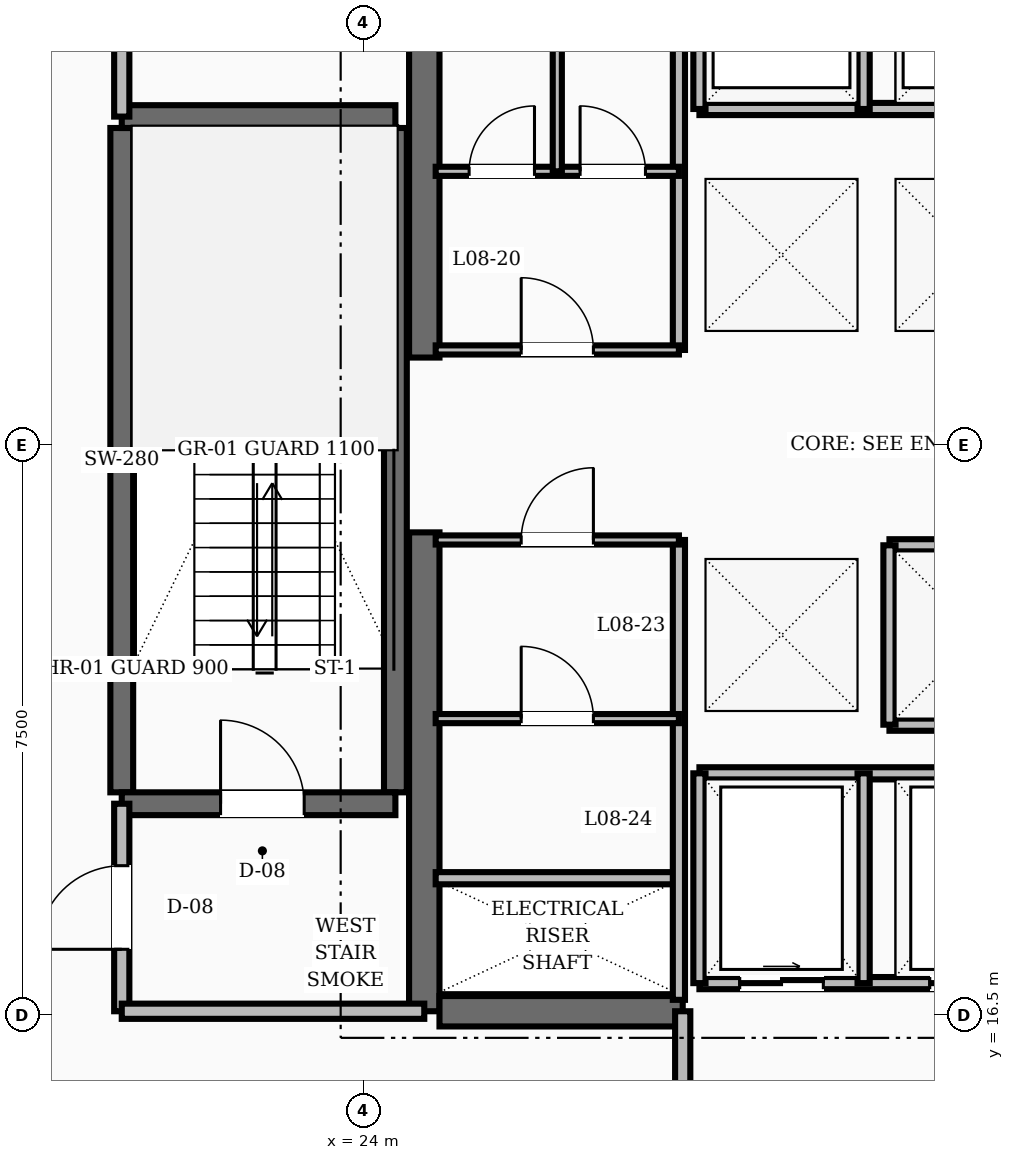
"""IFC4 building model, lengths in metres.
Left out: names, types, materials, properties, quantities, classifications, styles, units other than length and angle.
Written with IfcOpenShell. Run it as: python <this file> out.ifc"""

import sys

from ifc_helpers import new_model, si_unit, direction, frame, frame_2d, origin, place, context, subcontext, project, spatial, rectangle, extrude, element, fill, save


model = new_model("IFC4")
c1 = context("Model", 3, precision=1e-05, world=origin(), true_north=direction((0.0, 1.0)))
c2 = subcontext(c1, "Body", "Model", "MODEL_VIEW")
j1 = project(units=[si_unit("LENGTHUNIT", "METRE"), si_unit("PLANEANGLEUNIT", "RADIAN")], contexts=[c1])
p1 = place(None, origin())
s1 = spatial("IfcSite", under=j1, at=p1, CompositionType="ELEMENT")
p2 = place(p1, origin())
s2 = spatial("IfcBuilding", under=s1, at=p2, CompositionType="ELEMENT")
p3 = place(p2, frame((0.0, 0.0, 37.6)))
s3 = spatial("IfcBuildingStorey", under=s2, at=p3, CompositionType="ELEMENT", Elevation=37.6)
for number, where, z_axis, x_axis in (
    (1, (24.8, 16.55, 0.0), (0.0, 0.0, 1.0), (0.0, 1.0, 0.0)),
    (2, (24.8, 25.15, 0.0), (0.0, 0.0, 1.0), (0.0, 1.0, 0.0)),
):
    element("IfcWall", number, at=place(p3, frame(where, z_axis=z_axis, x_axis=x_axis)), inside=s3, PredefinedType="SHEAR", context=c2, shape_type="SweptSolid", body=[
        extrude(rectangle(XDim=6.3, YDim=0.4, at=frame_2d((3.15, 0.0))), origin(), (0.0, 0.0, 1.0), 3.6),
    ])
p4 = place(p3, frame((25.0, 16.55, 0.0), z_axis=(0.0, 0.0, 1.0), x_axis=(1.0, 0.0, 0.0)))
e3 = element("IfcWall", 3, at=p4, inside=s3, PredefinedType="SHEAR", context=c2, shape_type="SweptSolid", body=[
    extrude(rectangle(XDim=3.2, YDim=0.4, at=frame_2d((1.6, 0.0))), origin(), (0.0, 0.0, 1.0), 3.6),
])
for number, where, z_axis, x_axis in (
    (4, (20.82, 19.43, 0.0), (0.0, 0.0, 1.0), (0.0, 1.0, 0.0)),
    (5, (24.42, 19.43, 0.0), (0.0, 0.0, 1.0), (0.0, 1.0, 0.0)),
):
    element("IfcWall", number, at=place(p3, frame(where, z_axis=z_axis, x_axis=x_axis)), inside=s3, PredefinedType="SHEAR", context=c2, shape_type="SweptSolid", body=[
        extrude(rectangle(XDim=8.74, YDim=0.3, at=frame_2d((4.37, 0.0))), origin(), (0.0, 0.0, 1.0), 3.6),
    ])
p5 = place(p3, frame((20.82, 19.28, 0.0), z_axis=(0.0, 0.0, 1.0), x_axis=(1.0, 0.0, 0.0)))
e6 = element("IfcWall", 6, at=p5, inside=s3, PredefinedType="SHEAR", context=c2, shape_type="SweptSolid", body=[
    extrude(rectangle(XDim=3.6, YDim=0.3, at=frame_2d((1.8, 0.0))), origin(), (0.0, 0.0, 1.0), 3.6),
])
p6 = place(p5, frame((1.3, 0.0, 0.0)))
e7 = element("IfcOpeningElement", 7, at=p6, cuts=e6, PredefinedType="OPENING", context=c2, shape_type="SweptSolid", body=[
    extrude(rectangle(XDim=1.1, YDim=2.1, at=frame_2d((0.55, 1.05))), frame((0.0, 0.16, 0.0), z_axis=(0.0, -1.0, 0.0), x_axis=(1.0, 0.0, 0.0)), (0.0, 0.0, 1.0), 0.32),
])
p7 = place(p3, frame((20.82, 28.32, 0.0), z_axis=(0.0, 0.0, 1.0), x_axis=(1.0, 0.0, 0.0)))
e8 = element("IfcWall", 8, at=p7, inside=s3, PredefinedType="SHEAR", context=c2, shape_type="SweptSolid", body=[
    extrude(rectangle(XDim=3.6, YDim=0.3, at=frame_2d((1.8, 0.0))), origin(), (0.0, 0.0, 1.0), 3.6),
])
p8 = place(p3, frame((20.82, 16.55, 0.0), z_axis=(0.0, 0.0, 1.0), x_axis=(0.0, 1.0, 0.0)))
e9 = element("IfcWall", 9, at=p8, inside=s3, PredefinedType="SOLIDWALL", context=c2, shape_type="SweptSolid", body=[
    extrude(rectangle(XDim=2.73, YDim=0.2, at=frame_2d((1.365, 0.0))), origin(), (0.0, 0.0, 1.0), 2.61),
])
p9 = place(p8, frame((0.815, 0.0, 0.0)))
e10 = element("IfcOpeningElement", 10, at=p9, cuts=e9, PredefinedType="OPENING", context=c2, shape_type="SweptSolid", body=[
    extrude(rectangle(XDim=1.1, YDim=2.1, at=frame_2d((0.55, 1.05))), frame((0.0, 0.11, 0.0), z_axis=(0.0, -1.0, 0.0), x_axis=(1.0, 0.0, 0.0)), (0.0, 0.0, 1.0), 0.22),
])
p10 = place(p3, frame((20.82, 16.55, 0.0), z_axis=(0.0, 0.0, 1.0), x_axis=(1.0, 0.0, 0.0)))
e11 = element("IfcWall", 11, at=p10, inside=s3, PredefinedType="SOLIDWALL", context=c2, shape_type="SweptSolid", body=[
    extrude(rectangle(XDim=3.98, YDim=0.2, at=frame_2d((1.99, 0.0))), origin(), (0.0, 0.0, 1.0), 2.61),
])
p11 = place(p3, frame((20.82, 28.32, 0.0), z_axis=(0.0, 0.0, 1.0), x_axis=(0.0, 1.0, 0.0)))
e12 = element("IfcWall", 12, at=p11, inside=s3, PredefinedType="SOLIDWALL", context=c2, shape_type="SweptSolid", body=[
    extrude(rectangle(XDim=3.13, YDim=0.2, at=frame_2d((1.565, 0.0))), origin(), (0.0, 0.0, 1.0), 2.61),
])
p12 = place(p11, frame((1.09, 0.0, 0.0)))
e13 = element("IfcOpeningElement", 13, at=p12, cuts=e12, PredefinedType="OPENING", context=c2, shape_type="SweptSolid", body=[
    extrude(rectangle(XDim=0.95, YDim=2.1, at=frame_2d((0.475, 1.05))), frame((0.0, 0.11, 0.0), z_axis=(0.0, -1.0, 0.0), x_axis=(1.0, 0.0, 0.0)), (0.0, 0.0, 1.0), 0.22),
])
p13 = place(p3, frame((28.2, 14.35, 0.0), z_axis=(0.0, 0.0, 1.0), x_axis=(0.0, 1.0, 0.0)))
e14 = element("IfcWall", 14, at=p13, inside=s3, PredefinedType="SOLIDWALL", context=c2, shape_type="SweptSolid", body=[
    extrude(rectangle(XDim=2.2, YDim=0.2, at=frame_2d((1.1, 0.0))), origin(), (0.0, 0.0, 1.0), 2.61),
])
p14 = place(p3, frame((28.42, 28.42, 0.0), z_axis=(0.0, 0.0, 1.0), x_axis=(1.0, 0.0, 0.0)))
e15 = element("IfcWall", 15, at=p14, inside=s3, PredefinedType="SOLIDWALL", context=c2, shape_type="SweptSolid", body=[
    extrude(rectangle(XDim=7.16, YDim=0.16, at=frame_2d((3.58, 0.0))), origin(), (0.0, 0.0, 1.0), 2.61),
])
for number, where, z_axis, x_axis in (
    (16, (28.42, 28.42, 0.0), (0.0, 0.0, 1.0), (0.0, 1.0, 0.0)),
    (17, (30.58, 28.42, 0.0), (0.0, 0.0, 1.0), (0.0, 1.0, 0.0)),
):
    element("IfcWall", number, at=place(p3, frame(where, z_axis=z_axis, x_axis=x_axis)), inside=s3, PredefinedType="SOLIDWALL", context=c2, shape_type="SweptSolid", body=[
        extrude(rectangle(XDim=2.16, YDim=0.16, at=frame_2d((1.08, 0.0))), origin(), (0.0, 0.0, 1.0), 2.61),
    ])
for number, where, z_axis, x_axis in (
    (18, (30.92, 22.68, 0.0), (0.0, 0.0, 1.0), (1.0, 0.0, 0.0)),
    (19, (30.92, 20.32, 0.0), (0.0, 0.0, 1.0), (1.0, 0.0, 0.0)),
):
    element("IfcWall", number, at=place(p3, frame(where, z_axis=z_axis, x_axis=x_axis)), inside=s3, PredefinedType="SOLIDWALL", context=c2, shape_type="SweptSolid", body=[
        extrude(rectangle(XDim=4.76, YDim=0.16, at=frame_2d((2.38, 0.0))), origin(), (0.0, 0.0, 1.0), 2.61),
    ])
p15 = place(p3, frame((30.92, 20.32, 0.0), z_axis=(0.0, 0.0, 1.0), x_axis=(0.0, 1.0, 0.0)))
e20 = element("IfcWall", 20, at=p15, inside=s3, PredefinedType="SOLIDWALL", context=c2, shape_type="SweptSolid", body=[
    extrude(rectangle(XDim=2.36, YDim=0.16, at=frame_2d((1.18, 0.0))), origin(), (0.0, 0.0, 1.0), 2.61),
])
p16 = place(p3, frame((28.42, 16.92, 0.0), z_axis=(0.0, 0.0, 1.0), x_axis=(1.0, 0.0, 0.0)))
e21 = element("IfcWall", 21, at=p16, inside=s3, PredefinedType="SOLIDWALL", context=c2, shape_type="SweptSolid", body=[
    extrude(rectangle(XDim=7.16, YDim=0.16, at=frame_2d((3.58, 0.0))), origin(), (0.0, 0.0, 1.0), 2.61),
])
p17 = place(p16, frame((0.53, 0.0, 0.0)))
e22 = element("IfcOpeningElement", 22, at=p17, cuts=e21, PredefinedType="OPENING", context=c2, shape_type="SweptSolid", body=[
    extrude(rectangle(XDim=1.1, YDim=2.15, at=frame_2d((0.55, 1.075))), frame((0.0, 0.09, 0.0), z_axis=(0.0, -1.0, 0.0), x_axis=(1.0, 0.0, 0.0)), (0.0, 0.0, 1.0), 0.18),
])
p18 = place(p16, frame((3.03, 0.0, 0.0)))
e23 = element("IfcOpeningElement", 23, at=p18, cuts=e21, PredefinedType="OPENING", context=c2, shape_type="SweptSolid", body=[
    extrude(rectangle(XDim=1.1, YDim=2.15, at=frame_2d((0.55, 1.075))), frame((0.0, 0.09, 0.0), z_axis=(0.0, -1.0, 0.0), x_axis=(1.0, 0.0, 0.0)), (0.0, 0.0, 1.0), 0.18),
])
p19 = place(p16, frame((5.53, 0.0, 0.0)))
e24 = element("IfcOpeningElement", 24, at=p19, cuts=e21, PredefinedType="OPENING", context=c2, shape_type="SweptSolid", body=[
    extrude(rectangle(XDim=1.1, YDim=2.15, at=frame_2d((0.55, 1.075))), frame((0.0, 0.09, 0.0), z_axis=(0.0, -1.0, 0.0), x_axis=(1.0, 0.0, 0.0)), (0.0, 0.0, 1.0), 0.18),
])
p20 = place(p3, frame((28.42, 19.68, 0.0), z_axis=(0.0, 0.0, 1.0), x_axis=(1.0, 0.0, 0.0)))
e25 = element("IfcWall", 25, at=p20, inside=s3, PredefinedType="SOLIDWALL", context=c2, shape_type="SweptSolid", body=[
    extrude(rectangle(XDim=7.16, YDim=0.16, at=frame_2d((3.58, 0.0))), origin(), (0.0, 0.0, 1.0), 2.61),
])
for number, where, z_axis, x_axis in (
    (26, (28.42, 16.92, 0.0), (0.0, 0.0, 1.0), (0.0, 1.0, 0.0)),
    (27, (30.58, 16.92, 0.0), (0.0, 0.0, 1.0), (0.0, 1.0, 0.0)),
):
    element("IfcWall", number, at=place(p3, frame(where, z_axis=z_axis, x_axis=x_axis)), inside=s3, PredefinedType="SOLIDWALL", context=c2, shape_type="SweptSolid", body=[
        extrude(rectangle(XDim=2.76, YDim=0.16, at=frame_2d((1.38, 0.0))), origin(), (0.0, 0.0, 1.0), 2.61),
    ])
p21 = place(p3, frame((24.95, 18.3, 0.0), z_axis=(0.0, 0.0, 1.0), x_axis=(1.0, 0.0, 0.0)))
e28 = element("IfcWall", 28, at=p21, inside=s3, PredefinedType="SOLIDWALL", context=c2, shape_type="SweptSolid", body=[
    extrude(rectangle(XDim=3.2, YDim=0.16, at=frame_2d((1.6, 0.0))), origin(), (0.0, 0.0, 1.0), 2.61),
])
p22 = place(p3, frame((28.15, 16.7, 0.0), z_axis=(0.0, 0.0, 1.0), x_axis=(0.0, 1.0, 0.0)))
e29 = element("IfcWall", 29, at=p22, inside=s3, PredefinedType="SOLIDWALL", context=c2, shape_type="SweptSolid", body=[
    extrude(rectangle(XDim=6.05, YDim=0.16, at=frame_2d((3.025, 0.0))), origin(), (0.0, 0.0, 1.0), 2.61),
])
p23 = place(p3, frame((28.15, 25.25, 0.0), z_axis=(0.0, 0.0, 1.0), x_axis=(0.0, 1.0, 0.0)))
e30 = element("IfcWall", 30, at=p23, inside=s3, PredefinedType="SOLIDWALL", context=c2, shape_type="SweptSolid", body=[
    extrude(rectangle(XDim=6.1, YDim=0.16, at=frame_2d((3.05, 0.0))), origin(), (0.0, 0.0, 1.0), 2.61),
])
p24 = place(p3, frame((24.95, 25.25, 0.0), z_axis=(0.0, 0.0, 1.0), x_axis=(1.0, 0.0, 0.0)))
e31 = element("IfcWall", 31, at=p24, inside=s3, PredefinedType="PARTITIONING", context=c2, shape_type="SweptSolid", body=[
    extrude(rectangle(XDim=3.2, YDim=0.12, at=frame_2d((1.6, 0.0))), origin(), (0.0, 0.0, 1.0), 2.61),
])
p25 = place(p24, frame((1.125, 0.0, 0.0)))
e32 = element("IfcOpeningElement", 32, at=p25, cuts=e31, PredefinedType="OPENING", context=c2, shape_type="SweptSolid", body=[
    extrude(rectangle(XDim=0.95, YDim=2.1, at=frame_2d((0.475, 1.05))), frame((0.0, 0.07, 0.0), z_axis=(0.0, -1.0, 0.0), x_axis=(1.0, 0.0, 0.0)), (0.0, 0.0, 1.0), 0.14),
])
p26 = place(p3, frame((24.95, 22.75, 0.0), z_axis=(0.0, 0.0, 1.0), x_axis=(1.0, 0.0, 0.0)))
e33 = element("IfcWall", 33, at=p26, inside=s3, PredefinedType="PARTITIONING", context=c2, shape_type="SweptSolid", body=[
    extrude(rectangle(XDim=3.2, YDim=0.12, at=frame_2d((1.6, 0.0))), origin(), (0.0, 0.0, 1.0), 2.61),
])
p27 = place(p26, frame((1.125, 0.0, 0.0)))
e34 = element("IfcOpeningElement", 34, at=p27, cuts=e33, PredefinedType="OPENING", context=c2, shape_type="SweptSolid", body=[
    extrude(rectangle(XDim=0.95, YDim=2.1, at=frame_2d((0.475, 1.05))), frame((0.0, 0.07, 0.0), z_axis=(0.0, -1.0, 0.0), x_axis=(1.0, 0.0, 0.0)), (0.0, 0.0, 1.0), 0.14),
])
p28 = place(p3, frame((24.95, 27.6, 0.0), z_axis=(0.0, 0.0, 1.0), x_axis=(1.0, 0.0, 0.0)))
e35 = element("IfcWall", 35, at=p28, inside=s3, PredefinedType="PARTITIONING", context=c2, shape_type="SweptSolid", body=[
    extrude(rectangle(XDim=3.2, YDim=0.12, at=frame_2d((1.6, 0.0))), origin(), (0.0, 0.0, 1.0), 2.61),
])
p29 = place(p28, frame((0.44, 0.0, 0.0)))
e36 = element("IfcOpeningElement", 36, at=p29, cuts=e35, PredefinedType="OPENING", context=c2, shape_type="SweptSolid", body=[
    extrude(rectangle(XDim=0.86, YDim=2.1, at=frame_2d((0.43, 1.05))), frame((0.0, 0.07, 0.0), z_axis=(0.0, -1.0, 0.0), x_axis=(1.0, 0.0, 0.0)), (0.0, 0.0, 1.0), 0.14),
])
p30 = place(p28, frame((1.9, 0.0, 0.0)))
e37 = element("IfcOpeningElement", 37, at=p30, cuts=e35, PredefinedType="OPENING", context=c2, shape_type="SweptSolid", body=[
    extrude(rectangle(XDim=0.86, YDim=2.1, at=frame_2d((0.43, 1.05))), frame((0.0, 0.07, 0.0), z_axis=(0.0, -1.0, 0.0), x_axis=(1.0, 0.0, 0.0)), (0.0, 0.0, 1.0), 0.14),
])
p31 = place(p3, frame((26.55, 27.6, 0.0), z_axis=(0.0, 0.0, 1.0), x_axis=(0.0, 1.0, 0.0)))
e38 = element("IfcWall", 38, at=p31, inside=s3, PredefinedType="PARTITIONING", context=c2, shape_type="SweptSolid", body=[
    extrude(rectangle(XDim=3.75, YDim=0.12, at=frame_2d((1.875, 0.0))), origin(), (0.0, 0.0, 1.0), 2.61),
])
p32 = place(p3, frame((24.95, 20.4, 0.0), z_axis=(0.0, 0.0, 1.0), x_axis=(1.0, 0.0, 0.0)))
e39 = element("IfcWall", 39, at=p32, inside=s3, PredefinedType="PARTITIONING", context=c2, shape_type="SweptSolid", body=[
    extrude(rectangle(XDim=3.2, YDim=0.12, at=frame_2d((1.6, 0.0))), origin(), (0.0, 0.0, 1.0), 2.61),
])
p33 = place(p32, frame((1.125, 0.0, 0.0)))
e40 = element("IfcOpeningElement", 40, at=p33, cuts=e39, PredefinedType="OPENING", context=c2, shape_type="SweptSolid", body=[
    extrude(rectangle(XDim=0.95, YDim=2.1, at=frame_2d((0.475, 1.05))), frame((0.0, 0.07, 0.0), z_axis=(0.0, -1.0, 0.0), x_axis=(1.0, 0.0, 0.0)), (0.0, 0.0, 1.0), 0.14),
])
p34 = place(p3, frame((18.655, 16.583, 0.0), z_axis=(0.0, 0.0, 1.0), x_axis=(0.702366174226, -0.711815816981, 0.0)))
e41 = element("IfcWall", 41, at=p34, inside=s3, PredefinedType="SOLIDWALL", context=c2, shape_type="SweptSolid", body=[
    extrude(rectangle(XDim=2.842, YDim=0.16, at=frame_2d((1.421, 0.0))), origin(), (0.0, 0.0, 1.0), 2.61),
])
p35 = place(p6, origin())
e42 = element("IfcDoor", 42, at=p35, inside=s3, OperationType="SINGLE_SWING_LEFT", PredefinedType="DOOR", context=c2, shape_type="SweptSolid", body=[
    extrude(rectangle(XDim=1.1, YDim=2.1, at=frame_2d((0.55, 1.05))), frame((0.0, 0.025, 0.0), z_axis=(0.0, -1.0, 0.0), x_axis=(1.0, 0.0, 0.0)), (0.0, 0.0, 1.0), 0.05),
])
fill(e7, e42)
p36 = place(p9, origin())
e43 = element("IfcDoor", 43, at=p36, inside=s3, OperationType="SINGLE_SWING_LEFT", PredefinedType="DOOR", context=c2, shape_type="SweptSolid", body=[
    extrude(rectangle(XDim=1.1, YDim=2.1, at=frame_2d((0.55, 1.05))), frame((0.0, 0.025, 0.0), z_axis=(0.0, -1.0, 0.0), x_axis=(1.0, 0.0, 0.0)), (0.0, 0.0, 1.0), 0.05),
])
fill(e10, e43)
p37 = place(p17, origin())
e44 = element("IfcDoor", 44, at=p37, inside=s3, OperationType="SLIDING_TO_RIGHT", PredefinedType="DOOR", context=c2, shape_type="SweptSolid", body=[
    extrude(rectangle(XDim=1.1, YDim=2.15, at=frame_2d((0.55, 1.075))), frame((0.0, 0.025, 0.0), z_axis=(0.0, -1.0, 0.0), x_axis=(1.0, 0.0, 0.0)), (0.0, 0.0, 1.0), 0.05),
])
fill(e22, e44)
p38 = place(p18, origin())
e45 = element("IfcDoor", 45, at=p38, inside=s3, OperationType="SLIDING_TO_RIGHT", PredefinedType="DOOR", context=c2, shape_type="SweptSolid", body=[
    extrude(rectangle(XDim=1.1, YDim=2.15, at=frame_2d((0.55, 1.075))), frame((0.0, 0.025, 0.0), z_axis=(0.0, -1.0, 0.0), x_axis=(1.0, 0.0, 0.0)), (0.0, 0.0, 1.0), 0.05),
])
fill(e23, e45)
p39 = place(p25, origin())
e46 = element("IfcDoor", 46, at=p39, inside=s3, OperationType="SINGLE_SWING_LEFT", PredefinedType="DOOR", context=c2, shape_type="SweptSolid", body=[
    extrude(rectangle(XDim=0.95, YDim=2.1, at=frame_2d((0.475, 1.05))), frame((0.0, 0.025, 0.0), z_axis=(0.0, -1.0, 0.0), x_axis=(1.0, 0.0, 0.0)), (0.0, 0.0, 1.0), 0.05),
])
fill(e32, e46)
p40 = place(p29, origin())
e47 = element("IfcDoor", 47, at=p40, inside=s3, OperationType="SINGLE_SWING_RIGHT", PredefinedType="DOOR", context=c2, shape_type="SweptSolid", body=[
    extrude(rectangle(XDim=0.86, YDim=2.1, at=frame_2d((0.43, 1.05))), frame((0.0, 0.025, 0.0), z_axis=(0.0, -1.0, 0.0), x_axis=(1.0, 0.0, 0.0)), (0.0, 0.0, 1.0), 0.05),
])
fill(e36, e47)
p41 = place(p30, origin())
e48 = element("IfcDoor", 48, at=p41, inside=s3, OperationType="SINGLE_SWING_LEFT", PredefinedType="DOOR", context=c2, shape_type="SweptSolid", body=[
    extrude(rectangle(XDim=0.86, YDim=2.1, at=frame_2d((0.43, 1.05))), frame((0.0, 0.025, 0.0), z_axis=(0.0, -1.0, 0.0), x_axis=(1.0, 0.0, 0.0)), (0.0, 0.0, 1.0), 0.05),
])
fill(e37, e48)
p42 = place(p27, origin())
e49 = element("IfcDoor", 49, at=p42, inside=s3, OperationType="SINGLE_SWING_RIGHT", PredefinedType="DOOR", context=c2, shape_type="SweptSolid", body=[
    extrude(rectangle(XDim=0.95, YDim=2.1, at=frame_2d((0.475, 1.05))), frame((0.0, 0.025, 0.0), z_axis=(0.0, -1.0, 0.0), x_axis=(1.0, 0.0, 0.0)), (0.0, 0.0, 1.0), 0.05),
])
fill(e34, e49)
p43 = place(p33, origin())
e50 = element("IfcDoor", 50, at=p43, inside=s3, OperationType="SINGLE_SWING_LEFT", PredefinedType="DOOR", context=c2, shape_type="SweptSolid", body=[
    extrude(rectangle(XDim=0.95, YDim=2.1, at=frame_2d((0.475, 1.05))), frame((0.0, 0.025, 0.0), z_axis=(0.0, -1.0, 0.0), x_axis=(1.0, 0.0, 0.0)), (0.0, 0.0, 1.0), 0.05),
])
fill(e40, e50)
save(model, sys.argv[1])
